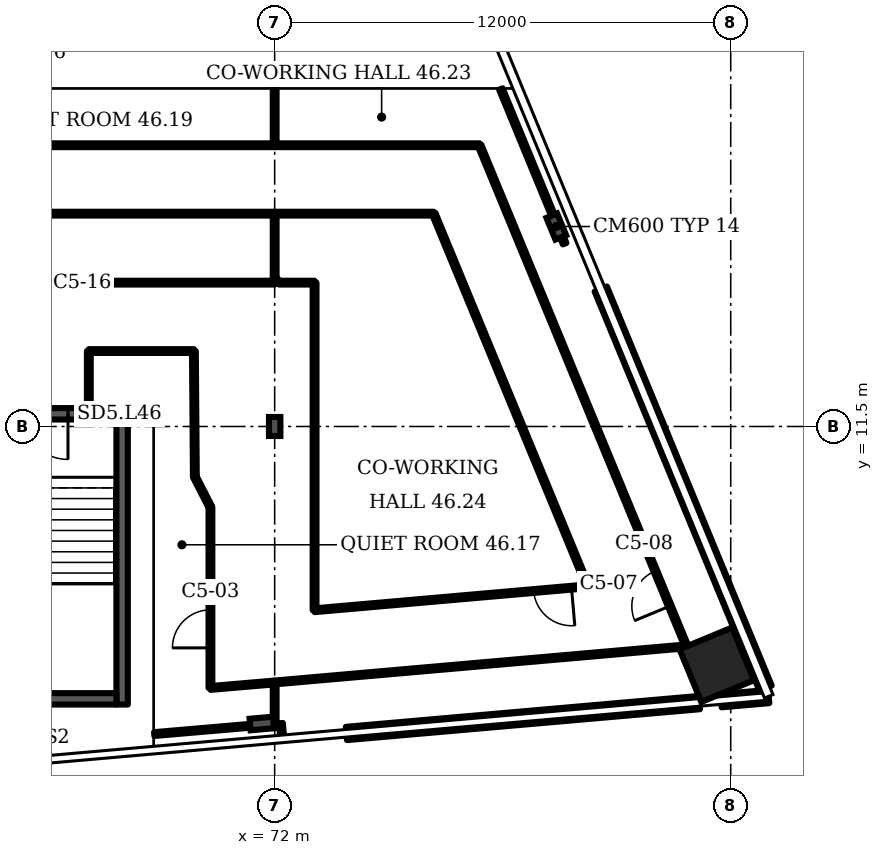
"""IFC4 building model, lengths in metres.
Left out: names, types, materials, properties, quantities, classifications, styles, units other than length and angle.
Written with IfcOpenShell. Run it as: python <this file> out.ifc"""

import sys

from ifc_helpers import new_model, si_unit, direction, frame, frame_2d, origin, origin_2d, place, context, subcontext, project, spatial, rectangle, i_section, extrude, element, fill, save


model = new_model("IFC4")
c1 = context("Model", 3, precision=1e-05, world=origin(), true_north=direction((0.0, 1.0)))
c2 = subcontext(c1, "Body", "Model", "MODEL_VIEW")
j1 = project(units=[si_unit("LENGTHUNIT", "METRE"), si_unit("PLANEANGLEUNIT", "RADIAN")], contexts=[c1])
p1 = place(None, origin())
s1 = spatial("IfcSite", under=j1, at=p1, CompositionType="ELEMENT")
p2 = place(p1, origin())
s2 = spatial("IfcBuilding", under=s1, at=p2, CompositionType="ELEMENT")
p3 = place(p2, frame((0.0, 0.0, 187.9)))
s3 = spatial("IfcBuildingStorey", under=s2, at=p3, CompositionType="ELEMENT", Elevation=187.9)
p4 = place(p3, frame((83.633, 5.231, 0.0), z_axis=(0.0, 0.0, 1.0), x_axis=(-0.381602, 0.924325, 0.0)))
e1 = element("IfcColumn", 1, at=p4, inside=s3, PredefinedType="COLUMN", context=c2, shape_type="SweptSolid", body=[
    extrude(rectangle(XDim=1.5, YDim=1.5, at=origin_2d()), origin(), (0.0, 0.0, 1.0), 3.6),
])
for number, where, z_axis, x_axis in (
    (2, (71.662, 3.685, 0.0), (0.0, 0.0, 1.0), (0.087, -0.996, 0.0)),
    (3, (79.41, 16.762, 0.0), (0.0, 0.0, 1.0), (0.924, 0.382, 0.0)),
):
    element("IfcColumn", number, at=place(p3, frame(where, z_axis=z_axis, x_axis=x_axis)), inside=s3, PredefinedType="COLUMN", context=c2, shape_type="SweptSolid", body=[
        extrude(i_section(OverallWidth=0.305, OverallDepth=0.62, WebThickness=0.021, FlangeThickness=0.04, FilletRadius=0.027, at=origin_2d()), origin(), (0.0, 0.0, 1.0), 3.6),
    ])
p5 = place(p3, frame((72.0, 11.5, 0.0), z_axis=(0.0, 0.0, 1.0), x_axis=(1.0, 0.0, 0.0)))
e4 = element("IfcColumn", 4, at=p5, inside=s3, PredefinedType="COLUMN", context=c2, shape_type="SweptSolid", body=[
    extrude(i_section(OverallWidth=0.3, OverallDepth=0.5, WebThickness=0.014, FlangeThickness=0.028, FilletRadius=0.027, at=origin_2d()), origin(), (0.0, 0.0, 1.0), 3.6),
])
p6 = place(p3, frame((73.887, 3.423, 0.0), z_axis=(0.0, 0.0, 1.0), x_axis=(0.996197, 0.087145, 0.0)))
e5 = element("IfcWall", 5, at=p6, inside=s3, PredefinedType="SOLIDWALL", context=c2, shape_type="SweptSolid", body=[
    extrude(rectangle(XDim=9.323, YDim=0.35, at=frame_2d((4.662, 0.0))), origin(), (0.0, 0.0, 1.0), 1.0),
])
p7 = place(p3, frame((83.745, 4.285, 0.0), z_axis=(0.0, 0.0, 1.0), x_axis=(0.996198, 0.087148, 0.0)))
e6 = element("IfcWall", 6, at=p7, inside=s3, PredefinedType="SOLIDWALL", context=c2, shape_type="SweptSolid", body=[
    extrude(rectangle(XDim=1.261, YDim=0.35, at=frame_2d((0.63, 0.0))), origin(), (0.0, 0.0, 1.0), 1.0),
])
p8 = place(p3, frame((84.916, 4.616, 0.0), z_axis=(0.0, 0.0, 1.0), x_axis=(-0.381598, 0.924328, 0.0)))
e7 = element("IfcWall", 7, at=p8, inside=s3, PredefinedType="SOLIDWALL", context=c2, shape_type="SweptSolid", body=[
    extrude(rectangle(XDim=11.361, YDim=0.35, at=frame_2d((5.68, 0.0))), origin(), (0.0, 0.0, 1.0), 1.0),
])
p9 = place(p3, frame((63.786, 11.834, 0.0), z_axis=(0.0, 0.0, 1.0), x_axis=(1.0, 0.0, 0.0)))
e8 = element("IfcWall", 8, at=p9, inside=s3, PredefinedType="SHEAR", context=c2, shape_type="SweptSolid", body=[
    extrude(rectangle(XDim=4.35, YDim=0.3, at=frame_2d((2.175, 0.0))), origin(), (0.0, 0.0, 1.0), 3.2),
])
p10 = place(p9, frame((1.575, 0.0, 0.0)))
e9 = element("IfcOpeningElement", 9, at=p10, cuts=e8, PredefinedType="OPENING", context=c2, shape_type="SweptSolid", body=[
    extrude(rectangle(XDim=1.2, YDim=2.1, at=frame_2d((0.6, 1.05))), frame((0.0, 0.16, 0.0), z_axis=(0.0, -1.0, 0.0), x_axis=(1.0, 0.0, 0.0)), (0.0, 0.0, 1.0), 0.32),
])
p11 = place(p3, frame((59.0, 15.285, 0.0), z_axis=(0.0, 0.0, 1.0), x_axis=(1.0, 0.0, 0.0)))
e10 = element("IfcWall", 10, at=p11, inside=s3, PredefinedType="PARTITIONING", context=c2, shape_type="SweptSolid", body=[
    extrude(rectangle(XDim=13.0, YDim=0.1, at=frame_2d((6.5, 0.0))), origin(), (0.0, 0.0, 1.0), 3.2),
])
p12 = place(p11, frame((5.98, 0.0, 0.0)))
e11 = element("IfcOpeningElement", 11, at=p12, cuts=e10, PredefinedType="OPENING", context=c2, shape_type="SweptSolid", body=[
    extrude(rectangle(XDim=1.0, YDim=2.1, at=frame_2d((0.5, 1.05))), frame((0.0, 0.06, 0.0), z_axis=(0.0, -1.0, 0.0), x_axis=(1.0, 0.0, 0.0)), (0.0, 0.0, 1.0), 0.12),
])
p13 = place(p3, frame((60.605, 17.1, 0.0), z_axis=(0.0, 0.0, 1.0), x_axis=(1.0, 0.0, 0.0)))
e12 = element("IfcWall", 12, at=p13, inside=s3, PredefinedType="PARTITIONING", context=c2, shape_type="SweptSolid", body=[
    extrude(rectangle(XDim=15.58, YDim=0.1, at=frame_2d((7.79, 0.0))), origin(), (0.0, 0.0, 1.0), 3.2),
])
p14 = place(p3, frame((62.405, 18.9, 0.0), z_axis=(0.0, 0.0, 1.0), x_axis=(1.0, 0.0, 0.0)))
e13 = element("IfcWall", 13, at=p14, inside=s3, PredefinedType="PARTITIONING", context=c2, shape_type="SweptSolid", body=[
    extrude(rectangle(XDim=14.985, YDim=0.1, at=frame_2d((7.492, 0.0))), origin(), (0.0, 0.0, 1.0), 3.2),
])
p15 = place(p3, frame((67.11, 12.004, 0.0), z_axis=(0.0, 0.0, 1.0), x_axis=(0.0, 1.0, 0.0)))
e14 = element("IfcWall", 14, at=p15, inside=s3, PredefinedType="PARTITIONING", context=c2, shape_type="SweptSolid", body=[
    extrude(rectangle(XDim=1.481, YDim=0.1, at=frame_2d((0.741, 0.0))), origin(), (0.0, 0.0, 1.0), 3.2),
])
p16 = place(p3, frame((67.11, 13.485, 0.0), z_axis=(0.0, 0.0, 1.0), x_axis=(1.0, 0.0, 0.0)))
e15 = element("IfcWall", 15, at=p16, inside=s3, PredefinedType="PARTITIONING", context=c2, shape_type="SweptSolid", body=[
    extrude(rectangle(XDim=2.765, YDim=0.1, at=frame_2d((1.382, 0.0))), origin(), (0.0, 0.0, 1.0), 3.2),
])
p17 = place(p3, frame((68.831, 3.407, 0.0), z_axis=(0.0, 0.0, 1.0), x_axis=(0.996308, 0.085898, 0.0)))
e16 = element("IfcWall", 16, at=p17, inside=s3, PredefinedType="PARTITIONING", context=c2, shape_type="SweptSolid", body=[
    extrude(rectangle(XDim=3.18, YDim=0.1, at=frame_2d((1.59, 0.0))), origin(), (0.0, 0.0, 1.0), 2.58),
])
p18 = place(p3, frame((69.9, 10.175, 0.0), z_axis=(0.0, 0.0, 1.0), x_axis=(-0.007523, 0.999969, 0.0)))
e17 = element("IfcWall", 17, at=p18, inside=s3, PredefinedType="PARTITIONING", context=c2, shape_type="SweptSolid", body=[
    extrude(rectangle(XDim=3.31, YDim=0.1, at=frame_2d((1.655, 0.0))), origin(), (0.0, 0.0, 1.0), 3.2),
])
p19 = place(p3, frame((70.31, 4.62, 0.0), z_axis=(0.0, 0.0, 1.0), x_axis=(0.996348, 0.085356, 0.0)))
e18 = element("IfcWall", 18, at=p19, inside=s3, PredefinedType="PARTITIONING", context=c2, shape_type="SweptSolid", body=[
    extrude(rectangle(XDim=1.696, YDim=0.1, at=frame_2d((0.848, 0.0))), origin(), (0.0, 0.0, 1.0), 3.2),
])
p20 = place(p3, frame((70.31, 9.375, 0.0), z_axis=(0.0, 0.0, 1.0), x_axis=(-0.456208, 0.889877, 0.0)))
e19 = element("IfcWall", 19, at=p20, inside=s3, PredefinedType="PARTITIONING", context=c2, shape_type="SweptSolid", body=[
    extrude(rectangle(XDim=0.899, YDim=0.1, at=frame_2d((0.45, 0.0))), origin(), (0.0, 0.0, 1.0), 3.2),
])
p21 = place(p3, frame((70.31, 4.62, 0.0), z_axis=(0.0, 0.0, 1.0), x_axis=(0.0, 1.0, 0.0)))
e20 = element("IfcWall", 20, at=p21, inside=s3, PredefinedType="PARTITIONING", context=c2, shape_type="SweptSolid", body=[
    extrude(rectangle(XDim=4.755, YDim=0.1, at=frame_2d((2.377, 0.0))), origin(), (0.0, 0.0, 1.0), 3.2),
])
p22 = place(p21, frame((1.055, 0.0, 0.0)))
e21 = element("IfcOpeningElement", 21, at=p22, cuts=e20, PredefinedType="OPENING", context=c2, shape_type="SweptSolid", body=[
    extrude(rectangle(XDim=1.0, YDim=2.1, at=frame_2d((0.5, 1.05))), frame((0.0, 0.06, 0.0), z_axis=(0.0, -1.0, 0.0), x_axis=(1.0, 0.0, 0.0)), (0.0, 0.0, 1.0), 0.12),
])
p23 = place(p3, frame((72.0, 3.68, 0.0), z_axis=(0.0, 0.0, 1.0), x_axis=(0.0, 1.0, 0.0)))
e22 = element("IfcWall", 22, at=p23, inside=s3, PredefinedType="PARTITIONING", context=c2, shape_type="SweptSolid", body=[
    extrude(rectangle(XDim=1.085, YDim=0.1, at=frame_2d((0.542, 0.0))), origin(), (0.0, 0.0, 1.0), 3.2),
])
p24 = place(p3, frame((72.0, 4.765, 0.0), z_axis=(0.0, 0.0, 1.0), x_axis=(0.996178, 0.087362, 0.0)))
e23 = element("IfcWall", 23, at=p24, inside=s3, PredefinedType="PARTITIONING", context=c2, shape_type="SweptSolid", body=[
    extrude(rectangle(XDim=10.876, YDim=0.1, at=frame_2d((5.438, 0.0))), origin(), (0.0, 0.0, 1.0), 3.2),
])
p25 = place(p3, frame((72.0, 15.285, 0.0), z_axis=(0.0, 0.0, 1.0), x_axis=(0.0, 1.0, 0.0)))
e24 = element("IfcWall", 24, at=p25, inside=s3, PredefinedType="PARTITIONING", context=c2, shape_type="SweptSolid", body=[
    extrude(rectangle(XDim=1.815, YDim=0.1, at=frame_2d((0.908, 0.0))), origin(), (0.0, 0.0, 1.0), 3.2),
])
p26 = place(p3, frame((72.0, 18.9, 0.0), z_axis=(0.0, 0.0, 1.0), x_axis=(0.0, 1.0, 0.0)))
e25 = element("IfcWall", 25, at=p26, inside=s3, PredefinedType="PARTITIONING", context=c2, shape_type="SweptSolid", body=[
    extrude(rectangle(XDim=1.48, YDim=0.1, at=frame_2d((0.74, 0.0))), origin(), (0.0, 0.0, 1.0), 3.2),
])
p27 = place(p3, frame((72.11, 15.285, 0.0), z_axis=(0.0, 0.0, 1.0), x_axis=(1.0, 0.0, 0.0)))
e26 = element("IfcWall", 26, at=p27, inside=s3, PredefinedType="PARTITIONING", context=c2, shape_type="SweptSolid", body=[
    extrude(rectangle(XDim=0.94, YDim=0.1, at=frame_2d((0.47, 0.0))), origin(), (0.0, 0.0, 1.0), 3.2),
])
p28 = place(p3, frame((72.11, 15.285, 0.0), z_axis=(0.0, 0.0, 1.0), x_axis=(-0.675728, 0.737158, 0.0)))
e27 = element("IfcWall", 27, at=p28, inside=s3, PredefinedType="PARTITIONING", context=c2, shape_type="SweptSolid", body=[
    extrude(rectangle(XDim=0.163, YDim=0.1, at=frame_2d((0.082, 0.0))), origin(), (0.0, 0.0, 1.0), 3.2),
])
p29 = place(p3, frame((72.198, 3.3, 0.0), z_axis=(0.0, 0.0, 1.0), x_axis=(-0.083759, 0.996486, 0.0)))
e28 = element("IfcWall", 28, at=p29, inside=s3, PredefinedType="PARTITIONING", context=c2, shape_type="SweptSolid", body=[
    extrude(rectangle(XDim=0.396, YDim=0.1, at=frame_2d((0.198, 0.0))), origin(), (0.0, 0.0, 1.0), 3.2),
])
p30 = place(p3, frame((73.05, 6.665, 0.0), z_axis=(0.0, 0.0, 1.0), x_axis=(0.996183, 0.087331, 0.0)))
e29 = element("IfcWall", 29, at=p30, inside=s3, PredefinedType="PARTITIONING", context=c2, shape_type="SweptSolid", body=[
    extrude(rectangle(XDim=7.213, YDim=0.1, at=frame_2d((3.606, 0.0))), origin(), (0.0, 0.0, 1.0), 3.2),
])
p31 = place(p30, frame((5.786, 0.0, 0.0)))
e30 = element("IfcOpeningElement", 30, at=p31, cuts=e29, PredefinedType="OPENING", context=c2, shape_type="SweptSolid", body=[
    extrude(rectangle(XDim=1.0, YDim=2.1, at=frame_2d((0.5, 1.05))), frame((0.0, 0.06, 0.0), z_axis=(0.0, -1.0, 0.0), x_axis=(1.0, 0.0, 0.0)), (0.0, 0.0, 1.0), 0.12),
])
p32 = place(p3, frame((73.05, 6.665, 0.0), z_axis=(0.0, 0.0, 1.0), x_axis=(0.0, 1.0, 0.0)))
e31 = element("IfcWall", 31, at=p32, inside=s3, PredefinedType="PARTITIONING", context=c2, shape_type="SweptSolid", body=[
    extrude(rectangle(XDim=8.62, YDim=0.1, at=frame_2d((4.31, 0.0))), origin(), (0.0, 0.0, 1.0), 3.2),
])
p33 = place(p3, frame((79.63, 16.31, 0.0), z_axis=(0.0, 0.0, 1.0), x_axis=(-0.380933, 0.9246, 0.0)))
e32 = element("IfcWall", 32, at=p33, inside=s3, PredefinedType="PARTITIONING", context=c2, shape_type="SweptSolid", body=[
    extrude(rectangle(XDim=4.402, YDim=0.1, at=frame_2d((2.201, 0.0))), origin(), (0.0, 0.0, 1.0), 2.58),
])
p34 = place(p3, frame((80.235, 7.295, 0.0), z_axis=(0.0, 0.0, 1.0), x_axis=(-0.381768, 0.924261, 0.0)))
e33 = element("IfcWall", 33, at=p34, inside=s3, PredefinedType="PARTITIONING", context=c2, shape_type="SweptSolid", body=[
    extrude(rectangle(XDim=10.609, YDim=0.1, at=frame_2d((5.304, 0.0))), origin(), (0.0, 0.0, 1.0), 3.2),
])
p35 = place(p3, frame((82.835, 5.715, 0.0), z_axis=(0.0, 0.0, 1.0), x_axis=(-0.381709, 0.924279, 0.0)))
e34 = element("IfcWall", 34, at=p35, inside=s3, PredefinedType="PARTITIONING", context=c2, shape_type="SweptSolid", body=[
    extrude(rectangle(XDim=14.265, YDim=0.1, at=frame_2d((7.132, 0.0))), origin(), (0.0, 0.0, 1.0), 3.2),
])
p36 = place(p35, frame((1.146, 0.0, 0.0)))
e35 = element("IfcOpeningElement", 35, at=p36, cuts=e34, PredefinedType="OPENING", context=c2, shape_type="SweptSolid", body=[
    extrude(rectangle(XDim=1.0, YDim=2.1, at=frame_2d((0.5, 1.05))), frame((0.0, 0.06, 0.0), z_axis=(0.0, -1.0, 0.0), x_axis=(1.0, 0.0, 0.0)), (0.0, 0.0, 1.0), 0.12),
])
p37 = place(p3, frame((67.986, 4.184, 0.0), z_axis=(0.0, 0.0, 1.0), x_axis=(0.0, 1.0, 0.0)))
e36 = element("IfcWall", 36, at=p37, inside=s3, PredefinedType="SHEAR", context=c2, shape_type="SweptSolid", body=[
    extrude(rectangle(XDim=7.5, YDim=0.3, at=frame_2d((3.75, 0.0))), origin(), (0.0, 0.0, 1.0), 3.2),
])
p38 = place(p3, frame((64.086, 4.334, 0.0), z_axis=(0.0, 0.0, 1.0), x_axis=(1.0, 0.0, 0.0)))
e37 = element("IfcWall", 37, at=p38, inside=s3, PredefinedType="SHEAR", context=c2, shape_type="SweptSolid", body=[
    extrude(rectangle(XDim=3.75, YDim=0.3, at=frame_2d((1.875, 0.0))), origin(), (0.0, 0.0, 1.0), 3.2),
])
p39 = place(p10, origin())
e38 = element("IfcDoor", 38, at=p39, inside=s3, OperationType="SINGLE_SWING_RIGHT", PredefinedType="DOOR", context=c2, shape_type="SweptSolid", body=[
    extrude(rectangle(XDim=1.2, YDim=2.1, at=frame_2d((0.6, 1.05))), frame((0.0, 0.025, 0.0), z_axis=(0.0, -1.0, 0.0), x_axis=(1.0, 0.0, 0.0)), (0.0, 0.0, 1.0), 0.05),
])
fill(e9, e38)
p40 = place(p22, origin())
e39 = element("IfcDoor", 39, at=p40, inside=s3, OperationType="SINGLE_SWING_LEFT", PredefinedType="DOOR", context=c2, shape_type="SweptSolid", body=[
    extrude(rectangle(XDim=1.0, YDim=2.1, at=frame_2d((0.5, 1.05))), frame((0.0, 0.025, 0.0), z_axis=(0.0, -1.0, 0.0), x_axis=(1.0, 0.0, 0.0)), (0.0, 0.0, 1.0), 0.05),
])
fill(e21, e39)
p41 = place(p31, origin())
e40 = element("IfcDoor", 40, at=p41, inside=s3, OperationType="SINGLE_SWING_RIGHT", PredefinedType="DOOR", context=c2, shape_type="SweptSolid", body=[
    extrude(rectangle(XDim=1.0, YDim=2.1, at=frame_2d((0.5, 1.05))), frame((0.0, 0.025, 0.0), z_axis=(0.0, -1.0, 0.0), x_axis=(1.0, 0.0, 0.0)), (0.0, 0.0, 1.0), 0.05),
])
fill(e30, e40)
p42 = place(p36, origin())
e41 = element("IfcDoor", 41, at=p42, inside=s3, OperationType="SINGLE_SWING_LEFT", PredefinedType="DOOR", context=c2, shape_type="SweptSolid", body=[
    extrude(rectangle(XDim=1.0, YDim=2.1, at=frame_2d((0.5, 1.05))), frame((0.0, 0.025, 0.0), z_axis=(0.0, -1.0, 0.0), x_axis=(1.0, 0.0, 0.0)), (0.0, 0.0, 1.0), 0.05),
])
fill(e35, e41)
save(model, sys.argv[1])
